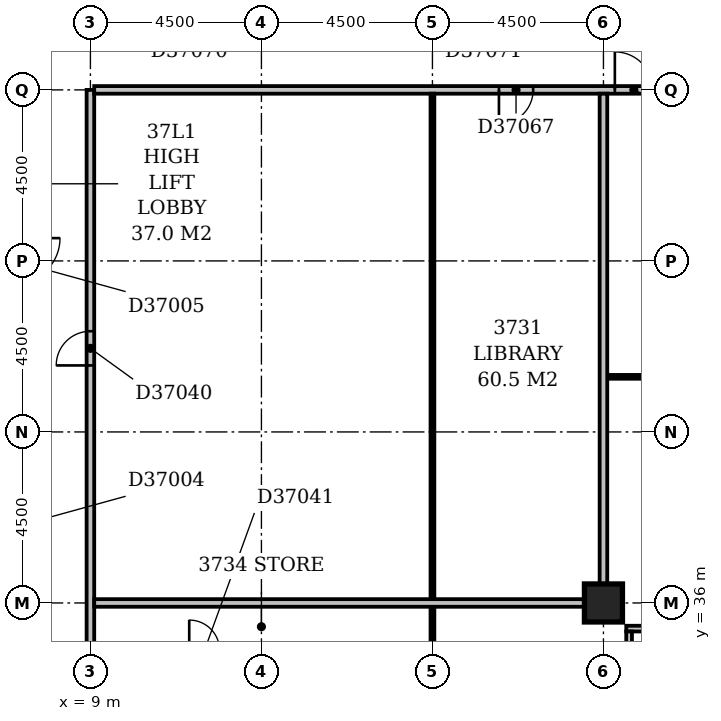
"""IFC4 building model, lengths in metres.
Left out: names, types, materials, properties, quantities, classifications, styles, units other than length and angle.
Written with IfcOpenShell. Run it as: python <this file> out.ifc"""

import sys

from ifc_helpers import new_model, si_unit, direction, frame, frame_2d, origin, origin_2d, place, context, subcontext, project, spatial, rectangle, extrude, element, fill, save


model = new_model("IFC4")
c1 = context("Model", 3, precision=1e-05, world=origin(), true_north=direction((0.0, 1.0)))
c2 = subcontext(c1, "Body", "Model", "MODEL_VIEW")
j1 = project(units=[si_unit("LENGTHUNIT", "METRE"), si_unit("PLANEANGLEUNIT", "RADIAN")], contexts=[c1])
p1 = place(None, origin())
s1 = spatial("IfcSite", under=j1, at=p1, CompositionType="ELEMENT")
p2 = place(p1, origin())
s2 = spatial("IfcBuilding", under=s1, at=p2, CompositionType="ELEMENT")
p3 = place(p2, frame((0.0, 0.0, 148.4)))
s3 = spatial("IfcBuildingStorey", under=s2, at=p3, CompositionType="ELEMENT", Elevation=148.4)
p4 = place(p3, frame((22.5, 36.0, -0.3), z_axis=(0.0, 0.0, 1.0), x_axis=(1.0, 0.0, 0.0)))
e1 = element("IfcColumn", 1, at=p4, inside=s3, PredefinedType="COLUMN", context=c2, shape_type="SweptSolid", body=[
    extrude(rectangle(XDim=1.0, YDim=1.0, at=origin_2d()), origin(), (0.0, 0.0, 1.0), 3.6),
])
p5 = place(p3, frame((23.175, 17.4, 0.0), z_axis=(0.0, 0.0, 1.0), x_axis=(0.0, 1.0, 0.0)))
e2 = element("IfcWall", 2, at=p5, inside=s3, PredefinedType="STANDARD", context=c2, shape_type="SweptSolid", body=[
    extrude(rectangle(XDim=17.85, YDim=0.15, at=frame_2d((8.925, 0.0))), origin(), (0.0, 0.0, 1.0), 2.7),
])
p6 = place(p5, frame((1.65, 0.0, 0.6)))
e3 = element("IfcOpeningElement", 3, at=p6, cuts=e2, PredefinedType="OPENING", context=c2, shape_type="SweptSolid", body=[
    extrude(rectangle(XDim=2.4, YDim=1.8, at=frame_2d((1.2, 0.9))), frame((0.0, 0.087, 0.0), z_axis=(0.0, -1.0, 0.0), x_axis=(1.0, 0.0, 0.0)), (0.0, 0.0, 1.0), 0.174),
])
p7 = place(p5, frame((5.848, 0.0, 0.6)))
e4 = element("IfcOpeningElement", 4, at=p7, cuts=e2, PredefinedType="OPENING", context=c2, shape_type="SweptSolid", body=[
    extrude(rectangle(XDim=0.9, YDim=1.8, at=frame_2d((0.45, 0.9))), frame((0.0, 0.087, 0.0), z_axis=(0.0, -1.0, 0.0), x_axis=(1.0, 0.0, 0.0)), (0.0, 0.0, 1.0), 0.174),
])
p8 = place(p5, frame((10.65, 0.0, 0.6)))
e5 = element("IfcOpeningElement", 5, at=p8, cuts=e2, PredefinedType="OPENING", context=c2, shape_type="SweptSolid", body=[
    extrude(rectangle(XDim=2.4, YDim=1.8, at=frame_2d((1.2, 0.9))), frame((0.0, 0.087, 0.0), z_axis=(0.0, -1.0, 0.0), x_axis=(1.0, 0.0, 0.0)), (0.0, 0.0, 1.0), 0.174),
])
p9 = place(p5, frame((15.15, 0.0, 0.6)))
e6 = element("IfcOpeningElement", 6, at=p9, cuts=e2, PredefinedType="OPENING", context=c2, shape_type="SweptSolid", body=[
    extrude(rectangle(XDim=2.4, YDim=1.8, at=frame_2d((1.2, 0.9))), frame((0.0, 0.087, 0.0), z_axis=(0.0, -1.0, 0.0), x_axis=(1.0, 0.0, 0.0)), (0.0, 0.0, 1.0), 0.174),
])
p10 = place(p3, frame((23.1, 35.325, 0.0), z_axis=(0.0, 0.0, 1.0), x_axis=(1.0, 0.0, 0.0)))
e7 = element("IfcWall", 7, at=p10, inside=s3, PredefinedType="STANDARD", context=c2, shape_type="SweptSolid", body=[
    extrude(rectangle(XDim=45.15, YDim=0.15, at=frame_2d((22.575, 0.0))), origin(), (0.0, 0.0, 1.0), 2.7),
])
p11 = place(p10, frame((0.45, 0.0, 0.6)))
e8 = element("IfcOpeningElement", 8, at=p11, cuts=e7, PredefinedType="OPENING", context=c2, shape_type="SweptSolid", body=[
    extrude(rectangle(XDim=2.4, YDim=1.8, at=frame_2d((1.2, 0.9))), frame((0.0, 0.087, 0.0), z_axis=(0.0, -1.0, 0.0), x_axis=(1.0, 0.0, 0.0)), (0.0, 0.0, 1.0), 0.174),
])
p12 = place(p10, frame((6.711, 0.0, 0.6)))
e9 = element("IfcOpeningElement", 9, at=p12, cuts=e7, PredefinedType="OPENING", context=c2, shape_type="SweptSolid", body=[
    extrude(rectangle(XDim=0.9, YDim=1.8, at=frame_2d((0.45, 0.9))), frame((0.0, 0.087, 0.0), z_axis=(0.0, -1.0, 0.0), x_axis=(1.0, 0.0, 0.0)), (0.0, 0.0, 1.0), 0.174),
])
p13 = place(p10, frame((9.45, 0.0, 0.6)))
e10 = element("IfcOpeningElement", 10, at=p13, cuts=e7, PredefinedType="OPENING", context=c2, shape_type="SweptSolid", body=[
    extrude(rectangle(XDim=2.4, YDim=1.8, at=frame_2d((1.2, 0.9))), frame((0.0, 0.087, 0.0), z_axis=(0.0, -1.0, 0.0), x_axis=(1.0, 0.0, 0.0)), (0.0, 0.0, 1.0), 0.174),
])
p14 = place(p10, frame((13.95, 0.0, 0.6)))
e11 = element("IfcOpeningElement", 11, at=p14, cuts=e7, PredefinedType="OPENING", context=c2, shape_type="SweptSolid", body=[
    extrude(rectangle(XDim=2.4, YDim=1.8, at=frame_2d((1.2, 0.9))), frame((0.0, 0.087, 0.0), z_axis=(0.0, -1.0, 0.0), x_axis=(1.0, 0.0, 0.0)), (0.0, 0.0, 1.0), 0.174),
])
p15 = place(p10, frame((18.153, 0.0, 0.6)))
e12 = element("IfcOpeningElement", 12, at=p15, cuts=e7, PredefinedType="OPENING", context=c2, shape_type="SweptSolid", body=[
    extrude(rectangle(XDim=1.5, YDim=1.8, at=frame_2d((0.75, 0.9))), frame((0.0, 0.087, 0.0), z_axis=(0.0, -1.0, 0.0), x_axis=(1.0, 0.0, 0.0)), (0.0, 0.0, 1.0), 0.174),
])
p16 = place(p10, frame((22.95, 0.0, 0.6)))
e13 = element("IfcOpeningElement", 13, at=p16, cuts=e7, PredefinedType="OPENING", context=c2, shape_type="SweptSolid", body=[
    extrude(rectangle(XDim=2.4, YDim=1.8, at=frame_2d((1.2, 0.9))), frame((0.0, 0.087, 0.0), z_axis=(0.0, -1.0, 0.0), x_axis=(1.0, 0.0, 0.0)), (0.0, 0.0, 1.0), 0.174),
])
p17 = place(p10, frame((27.45, 0.0, 0.6)))
e14 = element("IfcOpeningElement", 14, at=p17, cuts=e7, PredefinedType="OPENING", context=c2, shape_type="SweptSolid", body=[
    extrude(rectangle(XDim=2.4, YDim=1.8, at=frame_2d((1.2, 0.9))), frame((0.0, 0.087, 0.0), z_axis=(0.0, -1.0, 0.0), x_axis=(1.0, 0.0, 0.0)), (0.0, 0.0, 1.0), 0.174),
])
p18 = place(p10, frame((31.689, 0.0, 0.6)))
e15 = element("IfcOpeningElement", 15, at=p18, cuts=e7, PredefinedType="OPENING", context=c2, shape_type="SweptSolid", body=[
    extrude(rectangle(XDim=1.2, YDim=1.8, at=frame_2d((0.6, 0.9))), frame((0.0, 0.087, 0.0), z_axis=(0.0, -1.0, 0.0), x_axis=(1.0, 0.0, 0.0)), (0.0, 0.0, 1.0), 0.174),
])
p19 = place(p10, frame((36.45, 0.0, 0.6)))
e16 = element("IfcOpeningElement", 16, at=p19, cuts=e7, PredefinedType="OPENING", context=c2, shape_type="SweptSolid", body=[
    extrude(rectangle(XDim=2.4, YDim=1.8, at=frame_2d((1.2, 0.9))), frame((0.0, 0.087, 0.0), z_axis=(0.0, -1.0, 0.0), x_axis=(1.0, 0.0, 0.0)), (0.0, 0.0, 1.0), 0.174),
])
p20 = place(p10, frame((40.95, 0.0, 0.6)))
e17 = element("IfcOpeningElement", 17, at=p20, cuts=e7, PredefinedType="OPENING", context=c2, shape_type="SweptSolid", body=[
    extrude(rectangle(XDim=2.4, YDim=1.8, at=frame_2d((1.2, 0.9))), frame((0.0, 0.087, 0.0), z_axis=(0.0, -1.0, 0.0), x_axis=(1.0, 0.0, 0.0)), (0.0, 0.0, 1.0), 0.174),
])
p21 = place(p3, frame((18.0, 31.6, 0.0), z_axis=(0.0, 0.0, 1.0), x_axis=(0.0, 1.0, 0.0)))
e18 = element("IfcWall", 18, at=p21, inside=s3, PredefinedType="PARTITIONING", context=c2, shape_type="SweptSolid", body=[
    extrude(rectangle(XDim=17.8, YDim=0.1, at=frame_2d((8.9, 0.0))), origin(), (0.0, 0.0, 1.0), 3.3),
])
p22 = place(p21, frame((1.7, 0.0, 0.0)))
e19 = element("IfcOpeningElement", 19, at=p22, cuts=e18, PredefinedType="OPENING", context=c2, shape_type="SweptSolid", body=[
    extrude(rectangle(XDim=0.9, YDim=2.1, at=frame_2d((0.45, 1.05))), frame((0.0, 0.062, 0.0), z_axis=(0.0, -1.0, 0.0), x_axis=(1.0, 0.0, 0.0)), (0.0, 0.0, 1.0), 0.124),
])
p23 = place(p3, frame((9.0, 34.75, 0.0), z_axis=(0.0, 0.0, 1.0), x_axis=(0.0, 1.0, 0.0)))
e20 = element("IfcWall", 20, at=p23, inside=s3, PredefinedType="PARTITIONING", context=c2, shape_type="SweptSolid", body=[
    extrude(rectangle(XDim=14.75, YDim=0.2, at=frame_2d((7.375, 0.0))), origin(), (0.0, 0.0, 1.0), 3.3),
])
p24 = place(p23, frame((7.5, 0.0, 0.0)))
e21 = element("IfcOpeningElement", 21, at=p24, cuts=e20, PredefinedType="OPENING", context=c2, shape_type="SweptSolid", body=[
    extrude(rectangle(XDim=0.9, YDim=2.1, at=frame_2d((0.45, 1.05))), frame((0.0, 0.112, 0.0), z_axis=(0.0, -1.0, 0.0), x_axis=(1.0, 0.0, 0.0)), (0.0, 0.0, 1.0), 0.224),
])
for number, where, z_axis, x_axis in (
    (22, (9.1, 36.0, 0.0), (0.0, 0.0, 1.0), (1.0, 0.0, 0.0)),
    (23, (22.5, 36.5, 0.0), (0.0, 0.0, 1.0), (0.0, 1.0, 0.0)),
):
    element("IfcWall", number, at=place(p3, frame(where, z_axis=z_axis, x_axis=x_axis)), inside=s3, PredefinedType="PARTITIONING", context=c2, shape_type="SweptSolid", body=[
        extrude(rectangle(XDim=12.9, YDim=0.2, at=frame_2d((6.45, 0.0))), origin(), (0.0, 0.0, 1.0), 3.3),
    ])
p25 = place(p3, frame((22.6, 41.95, 0.0), z_axis=(0.0, 0.0, 1.0), x_axis=(1.0, 0.0, 0.0)))
e24 = element("IfcWall", 24, at=p25, inside=s3, PredefinedType="PARTITIONING", context=c2, shape_type="SweptSolid", body=[
    extrude(rectangle(XDim=8.8, YDim=0.1, at=frame_2d((4.4, 0.0))), origin(), (0.0, 0.0, 1.0), 3.3),
])
p26 = place(p25, frame((1.7, 0.0, 0.0)))
e25 = element("IfcOpeningElement", 25, at=p26, cuts=e24, PredefinedType="OPENING", context=c2, shape_type="SweptSolid", body=[
    extrude(rectangle(XDim=0.9, YDim=2.1, at=frame_2d((0.45, 1.05))), frame((0.0, 0.062, 0.0), z_axis=(0.0, -1.0, 0.0), x_axis=(1.0, 0.0, 0.0)), (0.0, 0.0, 1.0), 0.124),
])
p27 = place(p25, frame((6.2, 0.0, 0.0)))
e26 = element("IfcOpeningElement", 26, at=p27, cuts=e24, PredefinedType="OPENING", context=c2, shape_type="SweptSolid", body=[
    extrude(rectangle(XDim=0.9, YDim=2.1, at=frame_2d((0.45, 1.05))), frame((0.0, 0.062, 0.0), z_axis=(0.0, -1.0, 0.0), x_axis=(1.0, 0.0, 0.0)), (0.0, 0.0, 1.0), 0.124),
])
p28 = place(p3, frame((9.1, 49.5, 0.0), z_axis=(0.0, 0.0, 1.0), x_axis=(1.0, 0.0, 0.0)))
e27 = element("IfcWall", 27, at=p28, inside=s3, PredefinedType="PARTITIONING", context=c2, shape_type="SweptSolid", body=[
    extrude(rectangle(XDim=23.55, YDim=0.2, at=frame_2d((11.775, 0.0))), origin(), (0.0, 0.0, 1.0), 3.3),
])
p29 = place(p28, frame((13.7, 0.0, 0.0)))
e28 = element("IfcOpeningElement", 28, at=p29, cuts=e27, PredefinedType="OPENING", context=c2, shape_type="SweptSolid", body=[
    extrude(rectangle(XDim=1.0, YDim=2.1, at=frame_2d((0.5, 1.05))), frame((0.0, 0.112, 0.0), z_axis=(0.0, -1.0, 0.0), x_axis=(1.0, 0.0, 0.0)), (0.0, 0.0, 1.0), 0.224),
])
p30 = place(p28, frame((10.65, 0.0, 0.0)))
e29 = element("IfcOpeningElement", 29, at=p30, cuts=e27, PredefinedType="OPENING", context=c2, shape_type="SweptSolid", body=[
    extrude(rectangle(XDim=0.9, YDim=2.1, at=frame_2d((0.45, 1.05))), frame((0.0, 0.112, 0.0), z_axis=(0.0, -1.0, 0.0), x_axis=(1.0, 0.0, 0.0)), (0.0, 0.0, 1.0), 0.224),
])
p31 = place(p24, origin())
e30 = element("IfcDoor", 30, at=p31, inside=s3, OperationType="SINGLE_SWING_LEFT", PredefinedType="DOOR", context=c2, shape_type="SweptSolid", body=[
    extrude(rectangle(XDim=0.9, YDim=2.1, at=frame_2d((0.45, 1.05))), frame((0.0, 0.025, 0.0), z_axis=(0.0, -1.0, 0.0), x_axis=(1.0, 0.0, 0.0)), (0.0, 0.0, 1.0), 0.05),
])
fill(e21, e30)
p32 = place(p29, origin())
e31 = element("IfcDoor", 31, at=p32, inside=s3, OperationType="SINGLE_SWING_LEFT", PredefinedType="DOOR", context=c2, shape_type="SweptSolid", body=[
    extrude(rectangle(XDim=1.0, YDim=2.1, at=frame_2d((0.5, 1.05))), frame((0.0, 0.025, 0.0), z_axis=(0.0, -1.0, 0.0), x_axis=(1.0, 0.0, 0.0)), (0.0, 0.0, 1.0), 0.05),
])
fill(e28, e31)
p33 = place(p30, frame((0.9, 0.0, 0.0), z_axis=(0.0, 0.0, 1.0), x_axis=(-1.0, 0.0, 0.0)))
e32 = element("IfcDoor", 32, at=p33, inside=s3, OperationType="SINGLE_SWING_RIGHT", PredefinedType="DOOR", context=c2, shape_type="SweptSolid", body=[
    extrude(rectangle(XDim=0.9, YDim=2.1, at=frame_2d((0.45, 1.05))), frame((0.0, 0.025, 0.0), z_axis=(0.0, -1.0, 0.0), x_axis=(1.0, 0.0, 0.0)), (0.0, 0.0, 1.0), 0.05),
])
fill(e29, e32)
save(model, sys.argv[1])
